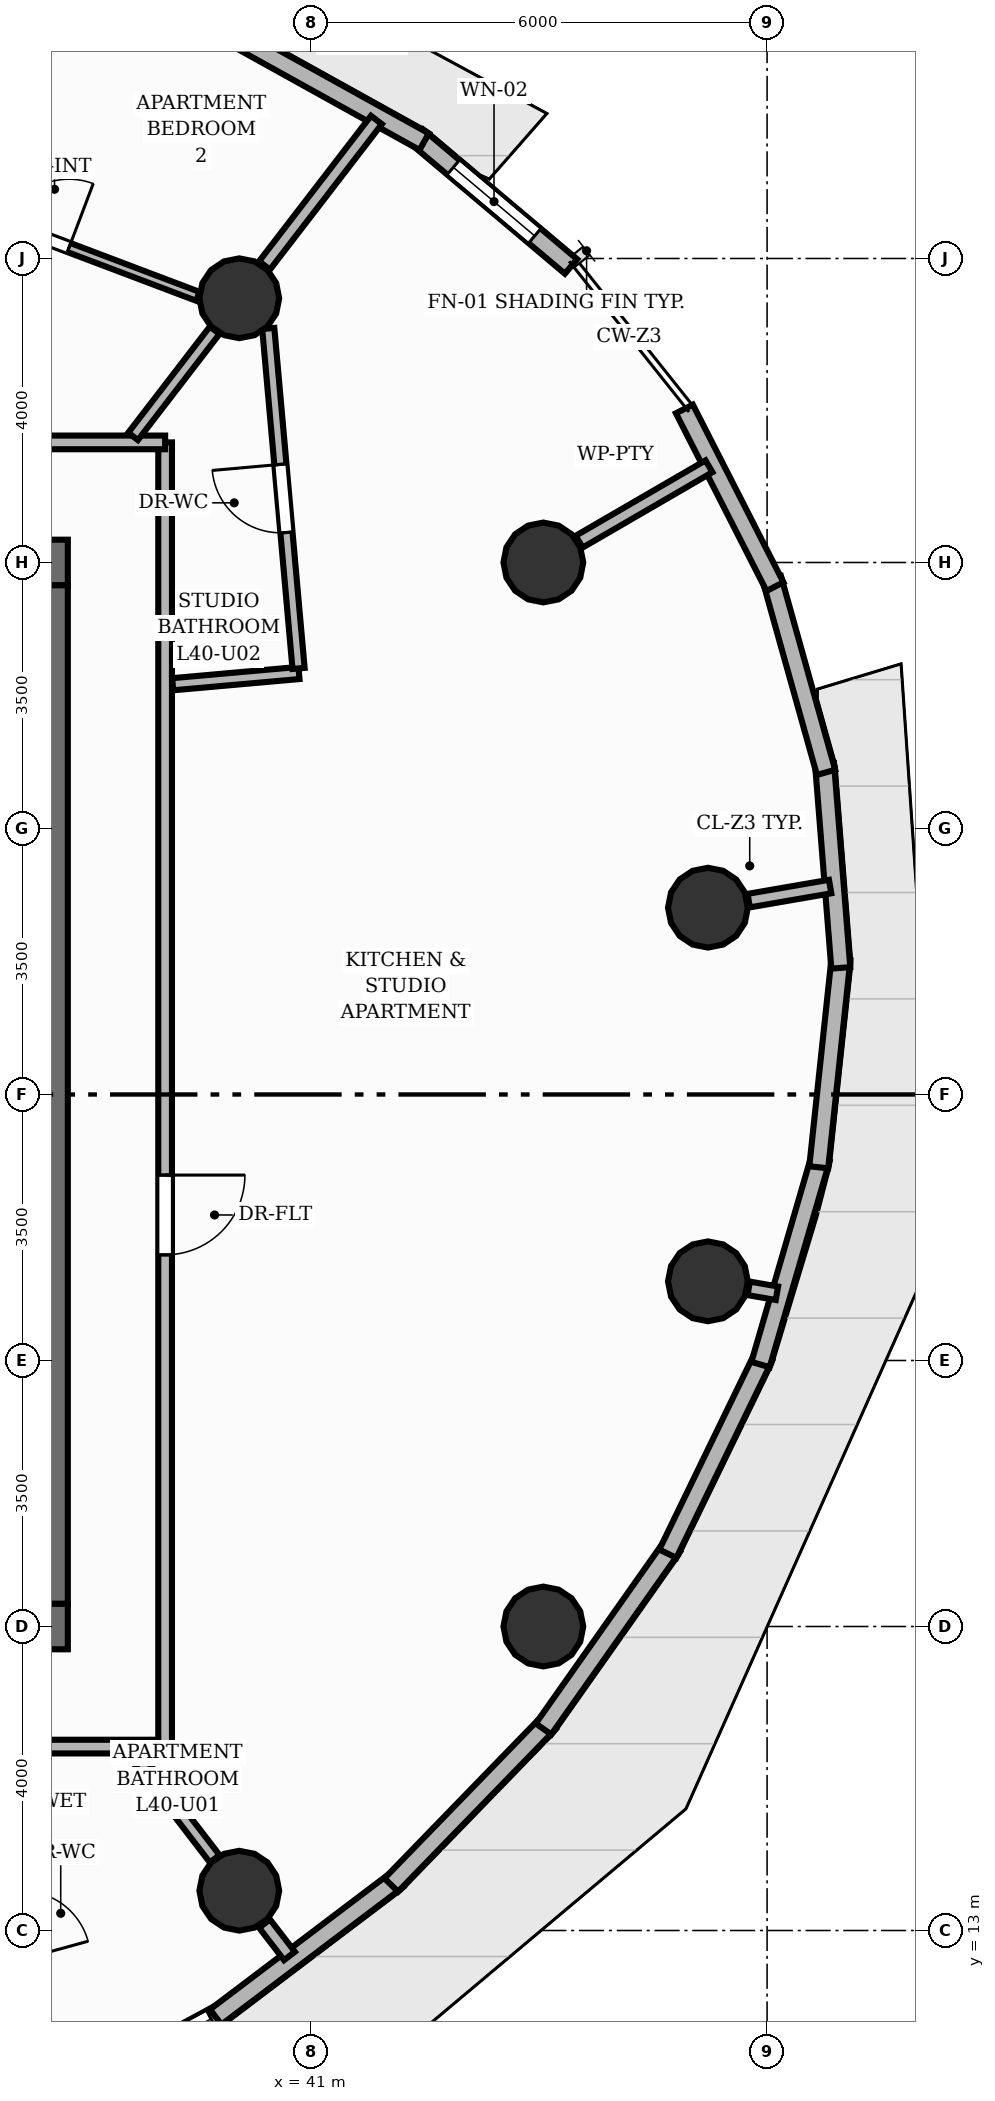
"""IFC4 building model, lengths in metres.
Left out: names, types, materials, properties, quantities, classifications, styles, units other than length and angle.
Written with IfcOpenShell. Run it as: python <this file> out.ifc"""

import sys

from ifc_helpers import new_model, si_unit, direction, frame, frame_2d, origin, origin_2d, place, context, subcontext, project, spatial, rectangle, circle, extrude, element, fill, save


model = new_model("IFC4")
c1 = context("Model", 3, precision=1e-05, world=origin(), true_north=direction((0.0, 1.0)))
c2 = subcontext(c1, "Body", "Model", "MODEL_VIEW")
j1 = project(units=[si_unit("LENGTHUNIT", "METRE"), si_unit("PLANEANGLEUNIT", "RADIAN")], contexts=[c1])
p1 = place(None, origin())
s1 = spatial("IfcSite", under=j1, at=p1, CompositionType="ELEMENT")
p2 = place(p1, origin())
s2 = spatial("IfcBuilding", under=s1, at=p2, CompositionType="ELEMENT")
p3 = place(p2, frame((0.0, 0.0, 136.16)))
s3 = spatial("IfcBuildingStorey", under=s2, at=p3, CompositionType="ELEMENT", Elevation=136.16)
p4 = place(p3, frame((22.7, 17.0, 0.0), z_axis=(0.0, 0.0, 1.0), x_axis=(1.0, 0.0, 0.0)))
e1 = element("IfcWall", 1, at=p4, inside=s3, PredefinedType="SHEAR", context=c2, shape_type="SweptSolid", body=[
    extrude(rectangle(XDim=15.1, YDim=0.6, at=frame_2d((7.55, 0.0))), origin(), (0.0, 0.0, 1.0), 3.2),
])
p5 = place(p4, frame((5.8, 0.0, 0.0)))
e2 = element("IfcOpeningElement", 2, at=p5, cuts=e1, PredefinedType="OPENING", context=c2, shape_type="SweptSolid", body=[
    extrude(rectangle(XDim=1.1, YDim=2.15, at=frame_2d((0.55, 1.075))), frame((0.0, 0.31, 0.0), z_axis=(0.0, -1.0, 0.0), x_axis=(1.0, 0.0, 0.0)), (0.0, 0.0, 1.0), 0.62),
])
p6 = place(p4, frame((9.35, 0.0, 0.0)))
e3 = element("IfcOpeningElement", 3, at=p6, cuts=e1, PredefinedType="OPENING", context=c2, shape_type="SweptSolid", body=[
    extrude(rectangle(XDim=0.9, YDim=2.1, at=frame_2d((0.45, 1.05))), frame((0.0, 0.31, 0.0), z_axis=(0.0, -1.0, 0.0), x_axis=(1.0, 0.0, 0.0)), (0.0, 0.0, 1.0), 0.62),
])
p7 = place(p3, frame((22.7, 31.0, 0.0), z_axis=(0.0, 0.0, 1.0), x_axis=(1.0, 0.0, 0.0)))
e4 = element("IfcWall", 4, at=p7, inside=s3, PredefinedType="SHEAR", context=c2, shape_type="SweptSolid", body=[
    extrude(rectangle(XDim=15.1, YDim=0.6, at=frame_2d((7.55, 0.0))), origin(), (0.0, 0.0, 1.0), 3.2),
])
p8 = place(p7, frame((11.7, 0.0, 0.0)))
e5 = element("IfcOpeningElement", 5, at=p8, cuts=e4, PredefinedType="OPENING", context=c2, shape_type="SweptSolid", body=[
    extrude(rectangle(XDim=1.1, YDim=2.15, at=frame_2d((0.55, 1.075))), frame((0.0, 0.31, 0.0), z_axis=(0.0, -1.0, 0.0), x_axis=(1.0, 0.0, 0.0)), (0.0, 0.0, 1.0), 0.62),
])
p9 = place(p3, frame((37.5, 17.3, 0.0), z_axis=(0.0, 0.0, 1.0), x_axis=(0.0, 1.0, 0.0)))
e6 = element("IfcWall", 6, at=p9, inside=s3, PredefinedType="SHEAR", context=c2, shape_type="SweptSolid", body=[
    extrude(rectangle(XDim=13.4, YDim=0.6, at=frame_2d((6.7, 0.0))), origin(), (0.0, 0.0, 1.0), 3.2),
])
for number, where, z_axis, x_axis in (
    (7, (46.221, 26.458, 0.0), (0.0, 0.0, 1.0), (1.0, 0.0, 0.0)),
    (8, (44.056, 31.0, 0.0), (0.0, 0.0, 1.0), (1.0, 0.0, 0.0)),
    (9, (40.056, 34.477, 0.0), (0.0, 0.0, 1.0), (1.0, 0.0, 0.0)),
    (10, (40.056, 13.523, 0.0), (0.0, 0.0, 1.0), (1.0, 0.0, 0.0)),
    (11, (44.056, 17.0, 0.0), (0.0, 0.0, 1.0), (1.0, 0.0, 0.0)),
    (12, (46.221, 21.542, 0.0), (0.0, 0.0, 1.0), (1.0, 0.0, 0.0)),
):
    element("IfcColumn", number, at=place(p3, frame(where, z_axis=z_axis, x_axis=x_axis)), inside=s3, PredefinedType="COLUMN", context=c2, shape_type="SweptSolid", body=[
        extrude(circle(Radius=0.525, at=origin_2d()), origin(), (0.0, 0.0, 1.0), 3.2),
    ])
p10 = place(p3, frame((42.395, 36.601, 0.0), z_axis=(0.0, 0.0, 1.0), x_axis=(0.764825125467, -0.644237943197, 0.0)))
e13 = element("IfcWall", 13, at=p10, inside=s3, PredefinedType="SOLIDWALL", context=c2, shape_type="SweptSolid", body=[
    extrude(rectangle(XDim=2.648, YDim=0.25, at=frame_2d((1.324, 0.0))), origin(), (0.0, 0.0, 1.0), 2.96),
])
p11 = place(p10, frame((0.624, 0.0, 0.85)))
e14 = element("IfcOpeningElement", 14, at=p11, cuts=e13, PredefinedType="OPENING", context=c2, shape_type="SweptSolid", body=[
    extrude(rectangle(XDim=1.4, YDim=1.55, at=frame_2d((0.7, 0.775))), frame((0.0, 0.135, 0.0), z_axis=(0.0, -1.0, 0.0), x_axis=(1.0, 0.0, 0.0)), (0.0, 0.0, 1.0), 0.27),
])
p12 = place(p3, frame((40.134, 37.844, 0.0), z_axis=(0.0, 0.0, 1.0), x_axis=(0.874341102682, -0.485311895755, 0.0)))
e15 = element("IfcWall", 15, at=p12, inside=s3, PredefinedType="SOLIDWALL", context=c2, shape_type="SweptSolid", body=[
    extrude(rectangle(XDim=2.693, YDim=0.25, at=frame_2d((1.346, 0.0))), origin(), (0.0, 0.0, 1.0), 2.96),
])
p13 = place(p3, frame((39.837, 11.921, 0.0), z_axis=(0.0, 0.0, 1.0), x_axis=(-0.879567466611, -0.475774181393, 0.0)))
e16 = element("IfcWall", 16, at=p13, inside=s3, PredefinedType="SOLIDWALL", context=c2, shape_type="SweptSolid", body=[
    extrude(rectangle(XDim=2.998, YDim=0.25, at=frame_2d((1.499, 0.0))), origin(), (0.0, 0.0, 1.0), 2.96),
])
p14 = place(p13, frame((0.175, 0.0, 0.85)))
e17 = element("IfcOpeningElement", 17, at=p14, cuts=e16, PredefinedType="OPENING", context=c2, shape_type="SweptSolid", body=[
    extrude(rectangle(XDim=1.65, YDim=1.55, at=frame_2d((0.825, 0.775))), frame((0.0, 0.135, 0.0), z_axis=(0.0, -1.0, 0.0), x_axis=(1.0, 0.0, 0.0)), (0.0, 0.0, 1.0), 0.27),
])
p15 = place(p3, frame((42.137, 13.671, 0.0), z_axis=(0.0, 0.0, 1.0), x_axis=(-0.797511213298, -0.603304122863, 0.0)))
e18 = element("IfcWall", 18, at=p15, inside=s3, PredefinedType="SOLIDWALL", context=c2, shape_type="SweptSolid", body=[
    extrude(rectangle(XDim=2.998, YDim=0.25, at=frame_2d((1.499, 0.0))), origin(), (0.0, 0.0, 1.0), 2.96),
])
p16 = place(p3, frame((44.128, 15.736, 0.0), z_axis=(0.0, 0.0, 1.0), x_axis=(-0.696240605886, -0.717808483312, 0.0)))
e19 = element("IfcWall", 19, at=p16, inside=s3, PredefinedType="SOLIDWALL", context=c2, shape_type="SweptSolid", body=[
    extrude(rectangle(XDim=2.977, YDim=0.25, at=frame_2d((1.489, 0.0))), origin(), (0.0, 0.0, 1.0), 2.96),
])
p17 = place(p3, frame((45.75, 18.052, 0.0), z_axis=(0.0, 0.0, 1.0), x_axis=(-0.576020449187, -0.817435283137, 0.0)))
e20 = element("IfcWall", 20, at=p17, inside=s3, PredefinedType="SOLIDWALL", context=c2, shape_type="SweptSolid", body=[
    extrude(rectangle(XDim=2.937, YDim=0.25, at=frame_2d((1.468, 0.0))), origin(), (0.0, 0.0, 1.0), 2.96),
])
p18 = place(p3, frame((46.953, 20.55, 0.0), z_axis=(0.0, 0.0, 1.0), x_axis=(-0.436882419805, -0.899518621967, 0.0)))
e21 = element("IfcWall", 21, at=p18, inside=s3, PredefinedType="SOLIDWALL", context=c2, shape_type="SweptSolid", body=[
    extrude(rectangle(XDim=2.882, YDim=0.25, at=frame_2d((1.441, 0.0))), origin(), (0.0, 0.0, 1.0), 2.96),
])
p19 = place(p3, frame((47.701, 23.152, 0.0), z_axis=(0.0, 0.0, 1.0), x_axis=(-0.27958078407, -0.960122172007, 0.0)))
e22 = element("IfcWall", 22, at=p19, inside=s3, PredefinedType="SOLIDWALL", context=c2, shape_type="SweptSolid", body=[
    extrude(rectangle(XDim=2.818, YDim=0.25, at=frame_2d((1.409, 0.0))), origin(), (0.0, 0.0, 1.0), 2.96),
])
p20 = place(p3, frame((47.971, 25.779, 0.0), z_axis=(0.0, 0.0, 1.0), x_axis=(-0.106010014212, -0.994365062181, 0.0)))
e23 = element("IfcWall", 23, at=p20, inside=s3, PredefinedType="SOLIDWALL", context=c2, shape_type="SweptSolid", body=[
    extrude(rectangle(XDim=2.752, YDim=0.25, at=frame_2d((1.376, 0.0))), origin(), (0.0, 0.0, 1.0), 2.96),
])
p21 = place(p3, frame((47.756, 28.35, 0.0), z_axis=(0.0, 0.0, 1.0), x_axis=(0.079420906371, -0.996841170714, 0.0)))
e24 = element("IfcWall", 24, at=p21, inside=s3, PredefinedType="SOLIDWALL", context=c2, shape_type="SweptSolid", body=[
    extrude(rectangle(XDim=2.693, YDim=0.25, at=frame_2d((1.346, 0.0))), origin(), (0.0, 0.0, 1.0), 2.96),
])
p22 = place(p3, frame((47.062, 30.789, 0.0), z_axis=(0.0, 0.0, 1.0), x_axis=(0.269469206067, -0.963009006698, 0.0)))
e25 = element("IfcWall", 25, at=p22, inside=s3, PredefinedType="SOLIDWALL", context=c2, shape_type="SweptSolid", body=[
    extrude(rectangle(XDim=2.648, YDim=0.25, at=frame_2d((1.324, 0.0))), origin(), (0.0, 0.0, 1.0), 2.96),
])
p23 = place(p3, frame((45.912, 33.02, 0.0), z_axis=(0.0, 0.0, 1.0), x_axis=(0.454196134835, -0.890901717981, 0.0)))
e26 = element("IfcWall", 26, at=p23, inside=s3, PredefinedType="SOLIDWALL", context=c2, shape_type="SweptSolid", body=[
    extrude(rectangle(XDim=2.624, YDim=0.25, at=frame_2d((1.312, 0.0))), origin(), (0.0, 0.0, 1.0), 2.96),
])
p24 = place(p3, frame((46.758, 26.551, 0.0), z_axis=(0.0, 0.0, 1.0), x_axis=(0.985361391556, 0.170478526599, 0.0)))
e27 = element("IfcWall", 27, at=p24, inside=s3, PredefinedType="PARTITIONING", context=c2, shape_type="SweptSolid", body=[
    extrude(rectangle(XDim=1.087, YDim=0.18, at=frame_2d((0.543, 0.0))), origin(), (0.0, 0.0, 1.0), 2.336),
])
p25 = place(p3, frame((44.528, 31.274, 0.0), z_axis=(0.0, 0.0, 1.0), x_axis=(0.864844369658, 0.502040054448, 0.0)))
e28 = element("IfcWall", 28, at=p25, inside=s3, PredefinedType="PARTITIONING", context=c2, shape_type="SweptSolid", body=[
    extrude(rectangle(XDim=1.974, YDim=0.18, at=frame_2d((0.987, 0.0))), origin(), (0.0, 0.0, 1.0), 2.336),
])
p26 = place(p3, frame((40.388, 34.908, 0.0), z_axis=(0.0, 0.0, 1.0), x_axis=(0.609549509747, 0.79274800231, 0.0)))
e29 = element("IfcWall", 29, at=p26, inside=s3, PredefinedType="PARTITIONING", context=c2, shape_type="SweptSolid", body=[
    extrude(rectangle(XDim=2.415, YDim=0.18, at=frame_2d((1.208, 0.0))), origin(), (0.0, 0.0, 1.0), 2.336),
])
p27 = place(p3, frame((40.388, 13.092, 0.0), z_axis=(0.0, 0.0, 1.0), x_axis=(0.609469486836, -0.792809526063, 0.0)))
e30 = element("IfcWall", 30, at=p27, inside=s3, PredefinedType="PARTITIONING", context=c2, shape_type="SweptSolid", body=[
    extrude(rectangle(XDim=0.538, YDim=0.18, at=frame_2d((0.269, 0.0))), origin(), (0.0, 0.0, 1.0), 2.336),
])
p28 = place(p3, frame((46.758, 21.449, 0.0), z_axis=(0.0, 0.0, 1.0), x_axis=(0.98535888436, -0.170493017491, 0.0)))
e31 = element("IfcWall", 31, at=p28, inside=s3, PredefinedType="PARTITIONING", context=c2, shape_type="SweptSolid", body=[
    extrude(rectangle(XDim=0.377, YDim=0.18, at=frame_2d((0.188, 0.0))), origin(), (0.0, 0.0, 1.0), 2.336),
])
p29 = place(p3, frame((39.08, 15.42, 0.0), z_axis=(0.0, 0.0, 1.0), x_axis=(-1.0, 0.0, 0.0)))
e32 = element("IfcWall", 32, at=p29, inside=s3, PredefinedType="PARTITIONING", context=c2, shape_type="SweptSolid", body=[
    extrude(rectangle(XDim=16.39, YDim=0.18, at=frame_2d((8.195, 0.0))), origin(), (0.0, 0.0, 1.0), 2.955),
])
p30 = place(p29, frame((4.593, 0.0, 0.0)))
e33 = element("IfcOpeningElement", 33, at=p30, cuts=e32, PredefinedType="OPENING", context=c2, shape_type="SweptSolid", body=[
    extrude(rectangle(XDim=1.05, YDim=2.15, at=frame_2d((0.525, 1.075))), frame((0.0, 0.1, 0.0), z_axis=(0.0, -1.0, 0.0), x_axis=(1.0, 0.0, 0.0)), (0.0, 0.0, 1.0), 0.2),
])
p31 = place(p3, frame((39.08, 32.58, 0.0), z_axis=(0.0, 0.0, 1.0), x_axis=(0.0, -1.0, 0.0)))
e34 = element("IfcWall", 34, at=p31, inside=s3, PredefinedType="PARTITIONING", context=c2, shape_type="SweptSolid", body=[
    extrude(rectangle(XDim=17.16, YDim=0.18, at=frame_2d((8.58, 0.0))), origin(), (0.0, 0.0, 1.0), 2.955),
])
p32 = place(p31, frame((9.64, 0.0, 0.0)))
e35 = element("IfcOpeningElement", 35, at=p32, cuts=e34, PredefinedType="OPENING", context=c2, shape_type="SweptSolid", body=[
    extrude(rectangle(XDim=1.05, YDim=2.15, at=frame_2d((0.525, 1.075))), frame((0.0, 0.1, 0.0), z_axis=(0.0, -1.0, 0.0), x_axis=(1.0, 0.0, 0.0)), (0.0, 0.0, 1.0), 0.2),
])
p33 = place(p3, frame((32.485, 32.58, 0.0), z_axis=(0.0, 0.0, 1.0), x_axis=(1.0, 0.0, 0.0)))
e36 = element("IfcWall", 36, at=p33, inside=s3, PredefinedType="PARTITIONING", context=c2, shape_type="SweptSolid", body=[
    extrude(rectangle(XDim=6.595, YDim=0.18, at=frame_2d((3.298, 0.0))), origin(), (0.0, 0.0, 1.0), 2.955),
])
p34 = place(p3, frame((36.455, 15.323, 0.0), z_axis=(0.0, 0.0, 1.0), x_axis=(0.265393905211, -0.964140070258, 0.0)))
e37 = element("IfcWall", 37, at=p34, inside=s3, PredefinedType="PLUMBINGWALL", context=c2, shape_type="SweptSolid", body=[
    extrude(rectangle(XDim=4.708, YDim=0.16, at=frame_2d((2.354, 0.0))), origin(), (0.0, 0.0, 1.0), 2.955),
])
p35 = place(p34, frame((1.904, 0.0, 0.0)))
e38 = element("IfcOpeningElement", 38, at=p35, cuts=e37, PredefinedType="OPENING", context=c2, shape_type="SweptSolid", body=[
    extrude(rectangle(XDim=0.9, YDim=2.1, at=frame_2d((0.45, 1.05))), frame((0.0, 0.09, 0.0), z_axis=(0.0, -1.0, 0.0), x_axis=(1.0, 0.0, 0.0)), (0.0, 0.0, 1.0), 0.18),
])
p36 = place(p3, frame((38.658, 15.341, 0.0), z_axis=(0.0, 0.0, 1.0), x_axis=(0.609536601946, -0.792757927042, 0.0)))
e39 = element("IfcWall", 39, at=p36, inside=s3, PredefinedType="PLUMBINGWALL", context=c2, shape_type="SweptSolid", body=[
    extrude(rectangle(XDim=1.761, YDim=0.16, at=frame_2d((0.881, 0.0))), origin(), (0.0, 0.0, 1.0), 2.336),
])
p37 = place(p3, frame((39.18, 29.398, 0.0), z_axis=(0.0, 0.0, 1.0), x_axis=(0.996058284503, 0.088701149215, 0.0)))
e40 = element("IfcWall", 40, at=p37, inside=s3, PredefinedType="PLUMBINGWALL", context=c2, shape_type="SweptSolid", body=[
    extrude(rectangle(XDim=1.668, YDim=0.16, at=frame_2d((0.834, 0.0))), origin(), (0.0, 0.0, 1.0), 2.955),
])
p38 = place(p3, frame((40.836, 29.606, 0.0), z_axis=(0.0, 0.0, 1.0), x_axis=(-0.08877110741, 0.996052052098, 0.0)))
e41 = element("IfcWall", 41, at=p38, inside=s3, PredefinedType="PLUMBINGWALL", context=c2, shape_type="SweptSolid", body=[
    extrude(rectangle(XDim=4.491, YDim=0.16, at=frame_2d((2.246, 0.0))), origin(), (0.0, 0.0, 1.0), 2.955),
])
p39 = place(p38, frame((1.796, 0.0, 0.0)))
e42 = element("IfcOpeningElement", 42, at=p39, cuts=e41, PredefinedType="OPENING", context=c2, shape_type="SweptSolid", body=[
    extrude(rectangle(XDim=0.9, YDim=2.1, at=frame_2d((0.45, 1.05))), frame((0.0, 0.09, 0.0), z_axis=(0.0, -1.0, 0.0), x_axis=(1.0, 0.0, 0.0)), (0.0, 0.0, 1.0), 0.18),
])
p40 = place(p3, frame((38.658, 32.659, 0.0), z_axis=(0.0, 0.0, 1.0), x_axis=(0.609536601946, 0.792757927042, 0.0)))
e43 = element("IfcWall", 43, at=p40, inside=s3, PredefinedType="PLUMBINGWALL", context=c2, shape_type="SweptSolid", body=[
    extrude(rectangle(XDim=1.761, YDim=0.16, at=frame_2d((0.881, 0.0))), origin(), (0.0, 0.0, 1.0), 2.336),
])
p41 = place(p3, frame((35.278, 36.103, 0.0), z_axis=(0.0, 0.0, 1.0), x_axis=(0.935309901838, -0.353829602385, 0.0)))
e44 = element("IfcWall", 44, at=p41, inside=s3, PredefinedType="PARTITIONING", context=c2, shape_type="SweptSolid", body=[
    extrude(rectangle(XDim=4.526, YDim=0.125, at=frame_2d((2.263, 0.0))), origin(), (0.0, 0.0, 1.0), 2.411),
])
p42 = place(p41, frame((1.813, 0.0, 0.0)))
e45 = element("IfcOpeningElement", 45, at=p42, cuts=e44, PredefinedType="OPENING", context=c2, shape_type="SweptSolid", body=[
    extrude(rectangle(XDim=0.9, YDim=2.1, at=frame_2d((0.45, 1.05))), frame((0.0, 0.073, 0.0), z_axis=(0.0, -1.0, 0.0), x_axis=(1.0, 0.0, 0.0)), (0.0, 0.0, 1.0), 0.145),
])
p43 = place(p11, origin())
e46 = element("IfcWindow", 46, at=p43, inside=s3, PartitioningType="SINGLE_PANEL", PredefinedType="WINDOW", context=c2, shape_type="SweptSolid", body=[
    extrude(rectangle(XDim=1.4, YDim=1.55, at=frame_2d((0.7, 0.775))), frame((0.0, 0.03, 0.0), z_axis=(0.0, -1.0, 0.0), x_axis=(1.0, 0.0, 0.0)), (0.0, 0.0, 1.0), 0.06),
])
fill(e14, e46)
p44 = place(p14, origin())
e47 = element("IfcWindow", 47, at=p44, inside=s3, PartitioningType="SINGLE_PANEL", PredefinedType="WINDOW", context=c2, shape_type="SweptSolid", body=[
    extrude(rectangle(XDim=1.65, YDim=1.55, at=frame_2d((0.825, 0.775))), frame((0.0, 0.03, 0.0), z_axis=(0.0, -1.0, 0.0), x_axis=(1.0, 0.0, 0.0)), (0.0, 0.0, 1.0), 0.06),
])
fill(e17, e47)
p45 = place(p32, origin())
e48 = element("IfcDoor", 48, at=p45, inside=s3, OperationType="SINGLE_SWING_LEFT", PredefinedType="DOOR", context=c2, shape_type="SweptSolid", body=[
    extrude(rectangle(XDim=1.05, YDim=2.15, at=frame_2d((0.525, 1.075))), frame((0.0, 0.025, 0.0), z_axis=(0.0, -1.0, 0.0), x_axis=(1.0, 0.0, 0.0)), (0.0, 0.0, 1.0), 0.05),
])
fill(e35, e48)
p46 = place(p39, origin())
e49 = element("IfcDoor", 49, at=p46, inside=s3, OperationType="SINGLE_SWING_RIGHT", PredefinedType="DOOR", context=c2, shape_type="SweptSolid", body=[
    extrude(rectangle(XDim=0.9, YDim=2.1, at=frame_2d((0.45, 1.05))), frame((0.0, 0.025, 0.0), z_axis=(0.0, -1.0, 0.0), x_axis=(1.0, 0.0, 0.0)), (0.0, 0.0, 1.0), 0.05),
])
fill(e42, e49)
p47 = place(p42, origin())
e50 = element("IfcDoor", 50, at=p47, inside=s3, OperationType="SINGLE_SWING_RIGHT", PredefinedType="DOOR", context=c2, shape_type="SweptSolid", body=[
    extrude(rectangle(XDim=0.9, YDim=2.1, at=frame_2d((0.45, 1.05))), frame((0.0, 0.025, 0.0), z_axis=(0.0, -1.0, 0.0), x_axis=(1.0, 0.0, 0.0)), (0.0, 0.0, 1.0), 0.05),
])
fill(e45, e50)
save(model, sys.argv[1])
